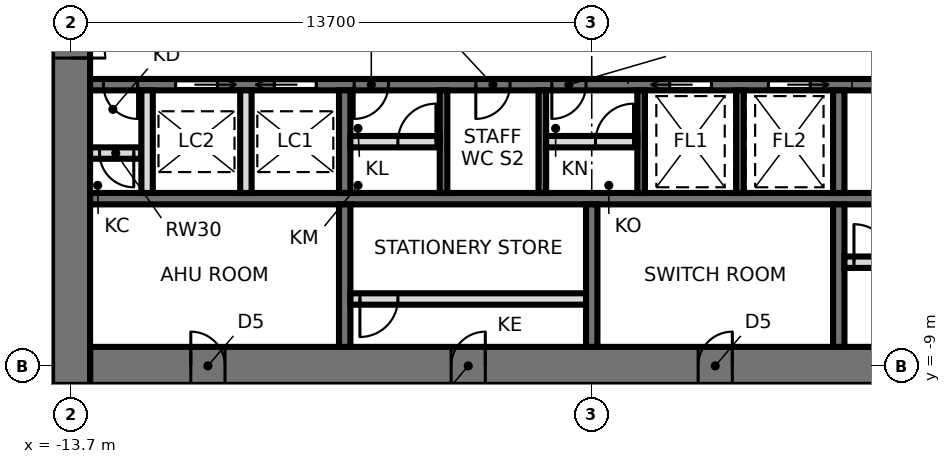
"""IFC4 building model, lengths in metres.
Left out: names, types, materials, properties, quantities, classifications, styles, units other than length and angle.
Written with IfcOpenShell. Run it as: python <this file> out.ifc"""

import sys

from ifc_helpers import new_model, si_unit, direction, frame, frame_2d, origin, place, context, subcontext, project, spatial, rectangle, extrude, element, fill, save


model = new_model("IFC4")
c1 = context("Model", 3, precision=1e-05, world=origin(), true_north=direction((0.0, 1.0)))
c2 = subcontext(c1, "Body", "Model", "MODEL_VIEW")
j1 = project(units=[si_unit("LENGTHUNIT", "METRE"), si_unit("PLANEANGLEUNIT", "RADIAN")], contexts=[c1])
p1 = place(None, origin())
s1 = spatial("IfcSite", under=j1, at=p1, CompositionType="ELEMENT")
p2 = place(p1, origin())
s2 = spatial("IfcBuilding", under=s1, at=p2, CompositionType="ELEMENT")
p3 = place(p2, frame((0.0, 0.0, 226.7)))
s3 = spatial("IfcBuildingStorey", under=s2, at=p3, CompositionType="ELEMENT", Elevation=226.7)
p4 = place(p3, frame((-13.2, -9.0, 0.0), z_axis=(0.0, 0.0, 1.0), x_axis=(1.0, 0.0, 0.0)))
e1 = element("IfcWall", 1, at=p4, inside=s3, PredefinedType="SHEAR", context=c2, shape_type="SweptSolid", body=[
    extrude(rectangle(XDim=26.4, YDim=1.0, at=frame_2d((13.2, 0.0))), origin(), (0.0, 0.0, 1.0), 3.9),
])
p5 = place(p4, frame((2.65, 0.0, 0.0)))
e2 = element("IfcOpeningElement", 2, at=p5, cuts=e1, PredefinedType="OPENING", context=c2, shape_type="SweptSolid", body=[
    extrude(rectangle(XDim=0.9, YDim=2.1, at=frame_2d((0.45, 1.05))), frame((0.0, 0.51, 0.0), z_axis=(0.0, -1.0, 0.0), x_axis=(1.0, 0.0, 0.0)), (0.0, 0.0, 1.0), 1.02),
])
p6 = place(p4, frame((9.5, 0.0, 0.0)))
e3 = element("IfcOpeningElement", 3, at=p6, cuts=e1, PredefinedType="OPENING", context=c2, shape_type="SweptSolid", body=[
    extrude(rectangle(XDim=0.9, YDim=2.1, at=frame_2d((0.45, 1.05))), frame((0.0, 0.51, 0.0), z_axis=(0.0, -1.0, 0.0), x_axis=(1.0, 0.0, 0.0)), (0.0, 0.0, 1.0), 1.02),
])
p7 = place(p4, frame((16.0, 0.0, 0.0)))
e4 = element("IfcOpeningElement", 4, at=p7, cuts=e1, PredefinedType="OPENING", context=c2, shape_type="SweptSolid", body=[
    extrude(rectangle(XDim=0.9, YDim=2.1, at=frame_2d((0.45, 1.05))), frame((0.0, 0.51, 0.0), z_axis=(0.0, -1.0, 0.0), x_axis=(1.0, 0.0, 0.0)), (0.0, 0.0, 1.0), 1.02),
])
p8 = place(p4, frame((22.85, 0.0, 0.0)))
e5 = element("IfcOpeningElement", 5, at=p8, cuts=e1, PredefinedType="OPENING", context=c2, shape_type="SweptSolid", body=[
    extrude(rectangle(XDim=0.9, YDim=2.1, at=frame_2d((0.45, 1.05))), frame((0.0, 0.51, 0.0), z_axis=(0.0, -1.0, 0.0), x_axis=(1.0, 0.0, 0.0)), (0.0, 0.0, 1.0), 1.02),
])
p9 = place(p3, frame((-13.7, 9.5, 0.0), z_axis=(0.0, 0.0, 1.0), x_axis=(0.0, -1.0, 0.0)))
e6 = element("IfcWall", 6, at=p9, inside=s3, PredefinedType="SHEAR", context=c2, shape_type="SweptSolid", body=[
    extrude(rectangle(XDim=19.0, YDim=1.0, at=frame_2d((9.5, 0.0))), origin(), (0.0, 0.0, 1.0), 3.9),
])
p10 = place(p9, frame((8.6, 0.0, 0.0)))
e7 = element("IfcOpeningElement", 7, at=p10, cuts=e6, PredefinedType="OPENING", context=c2, shape_type="SweptSolid", body=[
    extrude(rectangle(XDim=1.8, YDim=2.4, at=frame_2d((0.9, 1.2))), frame((0.0, 0.51, 0.0), z_axis=(0.0, -1.0, 0.0), x_axis=(1.0, 0.0, 0.0)), (0.0, 0.0, 1.0), 1.02),
])
p11 = place(p3, frame((-13.2, -1.6, 0.0), z_axis=(0.0, 0.0, 1.0), x_axis=(1.0, 0.0, 0.0)))
e8 = element("IfcWall", 8, at=p11, inside=s3, PredefinedType="SHEAR", context=c2, shape_type="SweptSolid", body=[
    extrude(rectangle(XDim=26.4, YDim=0.3, at=frame_2d((13.2, 0.0))), origin(), (0.0, 0.0, 1.0), 3.9),
])
p12 = place(p11, frame((25.15, 0.0, 0.0)))
e9 = element("IfcOpeningElement", 9, at=p12, cuts=e8, PredefinedType="OPENING", context=c2, shape_type="SweptSolid", body=[
    extrude(rectangle(XDim=1.0, YDim=2.1, at=frame_2d((0.5, 1.05))), frame((0.0, 0.16, 0.0), z_axis=(0.0, -1.0, 0.0), x_axis=(1.0, 0.0, 0.0)), (0.0, 0.0, 1.0), 0.32),
])
p13 = place(p11, frame((6.95, 0.0, 0.0)))
e10 = element("IfcOpeningElement", 10, at=p13, cuts=e8, PredefinedType="OPENING", context=c2, shape_type="SweptSolid", body=[
    extrude(rectangle(XDim=0.9, YDim=2.1, at=frame_2d((0.45, 1.05))), frame((0.0, 0.16, 0.0), z_axis=(0.0, -1.0, 0.0), x_axis=(1.0, 0.0, 0.0)), (0.0, 0.0, 1.0), 0.32),
])
p14 = place(p11, frame((10.15, 0.0, 0.0)))
e11 = element("IfcOpeningElement", 11, at=p14, cuts=e8, PredefinedType="OPENING", context=c2, shape_type="SweptSolid", body=[
    extrude(rectangle(XDim=0.9, YDim=2.1, at=frame_2d((0.45, 1.05))), frame((0.0, 0.16, 0.0), z_axis=(0.0, -1.0, 0.0), x_axis=(1.0, 0.0, 0.0)), (0.0, 0.0, 1.0), 0.32),
])
p15 = place(p11, frame((12.15, 0.0, 0.0)))
e12 = element("IfcOpeningElement", 12, at=p15, cuts=e8, PredefinedType="OPENING", context=c2, shape_type="SweptSolid", body=[
    extrude(rectangle(XDim=0.9, YDim=2.1, at=frame_2d((0.45, 1.05))), frame((0.0, 0.16, 0.0), z_axis=(0.0, -1.0, 0.0), x_axis=(1.0, 0.0, 0.0)), (0.0, 0.0, 1.0), 0.32),
])
p16 = place(p11, frame((15.25, 0.0, 0.0)))
e13 = element("IfcOpeningElement", 13, at=p16, cuts=e8, PredefinedType="OPENING", context=c2, shape_type="SweptSolid", body=[
    extrude(rectangle(XDim=1.1, YDim=2.3, at=frame_2d((0.55, 1.15))), frame((0.0, 0.16, 0.0), z_axis=(0.0, -1.0, 0.0), x_axis=(1.0, 0.0, 0.0)), (0.0, 0.0, 1.0), 0.32),
])
p17 = place(p11, frame((17.85, 0.0, 0.0)))
e14 = element("IfcOpeningElement", 14, at=p17, cuts=e8, PredefinedType="OPENING", context=c2, shape_type="SweptSolid", body=[
    extrude(rectangle(XDim=1.1, YDim=2.3, at=frame_2d((0.55, 1.15))), frame((0.0, 0.16, 0.0), z_axis=(0.0, -1.0, 0.0), x_axis=(1.0, 0.0, 0.0)), (0.0, 0.0, 1.0), 0.32),
])
p18 = place(p11, frame((4.85, 0.0, 0.0)))
e15 = element("IfcOpeningElement", 15, at=p18, cuts=e8, PredefinedType="OPENING", context=c2, shape_type="SweptSolid", body=[
    extrude(rectangle(XDim=1.1, YDim=2.3, at=frame_2d((0.55, 1.15))), frame((0.0, 0.16, 0.0), z_axis=(0.0, -1.0, 0.0), x_axis=(1.0, 0.0, 0.0)), (0.0, 0.0, 1.0), 0.32),
])
p19 = place(p11, frame((2.25, 0.0, 0.0)))
e16 = element("IfcOpeningElement", 16, at=p19, cuts=e8, PredefinedType="OPENING", context=c2, shape_type="SweptSolid", body=[
    extrude(rectangle(XDim=1.1, YDim=2.3, at=frame_2d((0.55, 1.15))), frame((0.0, 0.16, 0.0), z_axis=(0.0, -1.0, 0.0), x_axis=(1.0, 0.0, 0.0)), (0.0, 0.0, 1.0), 0.32),
])
p20 = place(p11, frame((0.35, 0.0, 0.0)))
e17 = element("IfcOpeningElement", 17, at=p20, cuts=e8, PredefinedType="OPENING", context=c2, shape_type="SweptSolid", body=[
    extrude(rectangle(XDim=0.9, YDim=2.1, at=frame_2d((0.45, 1.05))), frame((0.0, 0.16, 0.0), z_axis=(0.0, -1.0, 0.0), x_axis=(1.0, 0.0, 0.0)), (0.0, 0.0, 1.0), 0.32),
])
p21 = place(p3, frame((-13.2, -4.6, 0.0), z_axis=(0.0, 0.0, 1.0), x_axis=(1.0, 0.0, 0.0)))
e18 = element("IfcWall", 18, at=p21, inside=s3, PredefinedType="SHEAR", context=c2, shape_type="SweptSolid", body=[
    extrude(rectangle(XDim=26.4, YDim=0.3, at=frame_2d((13.2, 0.0))), origin(), (0.0, 0.0, 1.0), 3.9),
])
p22 = place(p3, frame((-6.5, -1.75, 0.0), z_axis=(0.0, 0.0, 1.0), x_axis=(0.0, -1.0, 0.0)))
e19 = element("IfcWall", 19, at=p22, inside=s3, PredefinedType="SHEAR", context=c2, shape_type="SweptSolid", body=[
    extrude(rectangle(XDim=2.7, YDim=0.3, at=frame_2d((1.35, 0.0))), origin(), (0.0, 0.0, 1.0), 3.9),
])
p23 = place(p3, frame((-6.5, -4.75, 0.0), z_axis=(0.0, 0.0, 1.0), x_axis=(0.0, -1.0, 0.0)))
e20 = element("IfcWall", 20, at=p23, inside=s3, PredefinedType="SHEAR", context=c2, shape_type="SweptSolid", body=[
    extrude(rectangle(XDim=3.75, YDim=0.3, at=frame_2d((1.875, 0.0))), origin(), (0.0, 0.0, 1.0), 3.9),
])
p24 = place(p3, frame((6.5, -1.75, 0.0), z_axis=(0.0, 0.0, 1.0), x_axis=(0.0, -1.0, 0.0)))
e21 = element("IfcWall", 21, at=p24, inside=s3, PredefinedType="SHEAR", context=c2, shape_type="SweptSolid", body=[
    extrude(rectangle(XDim=2.7, YDim=0.3, at=frame_2d((1.35, 0.0))), origin(), (0.0, 0.0, 1.0), 3.9),
])
p25 = place(p3, frame((6.5, -4.75, 0.0), z_axis=(0.0, 0.0, 1.0), x_axis=(0.0, -1.0, 0.0)))
e22 = element("IfcWall", 22, at=p25, inside=s3, PredefinedType="SHEAR", context=c2, shape_type="SweptSolid", body=[
    extrude(rectangle(XDim=3.75, YDim=0.3, at=frame_2d((1.875, 0.0))), origin(), (0.0, 0.0, 1.0), 3.9),
])
for number, where, z_axis, x_axis in (
    (23, (-3.9, -1.75, 0.0), (0.0, 0.0, 1.0), (0.0, -1.0, 0.0)),
    (24, (-1.3, -1.75, 0.0), (0.0, 0.0, 1.0), (0.0, -1.0, 0.0)),
    (25, (1.3, -1.75, 0.0), (0.0, 0.0, 1.0), (0.0, -1.0, 0.0)),
    (26, (3.9, -1.75, 0.0), (0.0, 0.0, 1.0), (0.0, -1.0, 0.0)),
):
    element("IfcWall", number, at=place(p3, frame(where, z_axis=z_axis, x_axis=x_axis)), inside=s3, PredefinedType="SHEAR", context=c2, shape_type="SweptSolid", body=[
        extrude(rectangle(XDim=2.7, YDim=0.2, at=frame_2d((1.35, 0.0))), origin(), (0.0, 0.0, 1.0), 3.9),
    ])
p26 = place(p3, frame((0.0, -4.75, 0.0), z_axis=(0.0, 0.0, 1.0), x_axis=(0.0, -1.0, 0.0)))
e27 = element("IfcWall", 27, at=p26, inside=s3, PredefinedType="SHEAR", context=c2, shape_type="SweptSolid", body=[
    extrude(rectangle(XDim=3.75, YDim=0.3, at=frame_2d((1.875, 0.0))), origin(), (0.0, 0.0, 1.0), 3.9),
])
p27 = place(p3, frame((-6.35, -3.1, 0.0), z_axis=(0.0, 0.0, 1.0), x_axis=(1.0, 0.0, 0.0)))
e28 = element("IfcWall", 28, at=p27, inside=s3, PredefinedType="PARTITIONING", context=c2, shape_type="SweptSolid", body=[
    extrude(rectangle(XDim=2.35, YDim=0.3, at=frame_2d((1.175, 0.0))), origin(), (0.0, 0.0, 1.0), 3.74),
])
p28 = place(p27, frame((1.25, 0.0, 0.0)))
e29 = element("IfcOpeningElement", 29, at=p28, cuts=e28, PredefinedType="OPENING", context=c2, shape_type="SweptSolid", body=[
    extrude(rectangle(XDim=1.0, YDim=2.4, at=frame_2d((0.5, 1.2))), frame((0.0, 0.16, 0.0), z_axis=(0.0, -1.0, 0.0), x_axis=(1.0, 0.0, 0.0)), (0.0, 0.0, 1.0), 0.32),
])
p29 = place(p3, frame((-1.2, -3.1, 0.0), z_axis=(0.0, 0.0, 1.0), x_axis=(1.0, 0.0, 0.0)))
e30 = element("IfcWall", 30, at=p29, inside=s3, PredefinedType="PARTITIONING", context=c2, shape_type="SweptSolid", body=[
    extrude(rectangle(XDim=2.4, YDim=0.3, at=frame_2d((1.2, 0.0))), origin(), (0.0, 0.0, 1.0), 3.74),
])
p30 = place(p29, frame((1.3, 0.0, 0.0)))
e31 = element("IfcOpeningElement", 31, at=p30, cuts=e30, PredefinedType="OPENING", context=c2, shape_type="SweptSolid", body=[
    extrude(rectangle(XDim=1.0, YDim=2.4, at=frame_2d((0.5, 1.2))), frame((0.0, 0.16, 0.0), z_axis=(0.0, -1.0, 0.0), x_axis=(1.0, 0.0, 0.0)), (0.0, 0.0, 1.0), 0.32),
])
p31 = place(p3, frame((-6.35, -7.24, 0.0), z_axis=(0.0, 0.0, 1.0), x_axis=(1.0, 0.0, 0.0)))
e32 = element("IfcWall", 32, at=p31, inside=s3, PredefinedType="PARTITIONING", context=c2, shape_type="SweptSolid", body=[
    extrude(rectangle(XDim=6.2, YDim=0.3, at=frame_2d((3.1, 0.0))), origin(), (0.0, 0.0, 1.0), 3.74),
])
p32 = place(p31, frame((0.25, 0.0, 0.0)))
e33 = element("IfcOpeningElement", 33, at=p32, cuts=e32, PredefinedType="OPENING", context=c2, shape_type="SweptSolid", body=[
    extrude(rectangle(XDim=1.0, YDim=2.4, at=frame_2d((0.5, 1.2))), frame((0.0, 0.16, 0.0), z_axis=(0.0, -1.0, 0.0), x_axis=(1.0, 0.0, 0.0)), (0.0, 0.0, 1.0), 0.32),
])
p33 = place(p3, frame((6.65, -6.272, 0.0), z_axis=(0.0, 0.0, 1.0), x_axis=(1.0, 0.0, 0.0)))
e34 = element("IfcWall", 34, at=p33, inside=s3, PredefinedType="PARTITIONING", context=c2, shape_type="SweptSolid", body=[
    extrude(rectangle(XDim=6.55, YDim=0.3, at=frame_2d((3.275, 0.0))), origin(), (0.0, 0.0, 1.0), 3.74),
])
p34 = place(p33, frame((0.25, 0.0, 0.0)))
e35 = element("IfcOpeningElement", 35, at=p34, cuts=e34, PredefinedType="OPENING", context=c2, shape_type="SweptSolid", body=[
    extrude(rectangle(XDim=1.0, YDim=2.4, at=frame_2d((0.5, 1.2))), frame((0.0, 0.16, 0.0), z_axis=(0.0, -1.0, 0.0), x_axis=(1.0, 0.0, 0.0)), (0.0, 0.0, 1.0), 0.32),
])
p35 = place(p3, frame((-13.2, -3.4, 0.0), z_axis=(0.0, 0.0, 1.0), x_axis=(1.0, 0.0, 0.0)))
e36 = element("IfcWall", 36, at=p35, inside=s3, PredefinedType="SOLIDWALL", context=c2, shape_type="SweptSolid", body=[
    extrude(rectangle(XDim=1.35, YDim=0.3, at=frame_2d((0.675, 0.0))), origin(), (0.0, 0.0, 1.0), 3.74),
])
p36 = place(p35, frame((0.25, 0.0, 0.0)))
e37 = element("IfcOpeningElement", 37, at=p36, cuts=e36, PredefinedType="OPENING", context=c2, shape_type="SweptSolid", body=[
    extrude(rectangle(XDim=0.9, YDim=2.1, at=frame_2d((0.45, 1.05))), frame((0.0, 0.16, 0.0), z_axis=(0.0, -1.0, 0.0), x_axis=(1.0, 0.0, 0.0)), (0.0, 0.0, 1.0), 0.32),
])
for number, where, z_axis, x_axis in (
    (38, (-9.1, -1.75, 0.0), (0.0, 0.0, 1.0), (0.0, -1.0, 0.0)),
    (39, (-11.7, -1.75, 0.0), (0.0, 0.0, 1.0), (0.0, -1.0, 0.0)),
):
    element("IfcWall", number, at=place(p3, frame(where, z_axis=z_axis, x_axis=x_axis)), inside=s3, PredefinedType="SOLIDWALL", context=c2, shape_type="SweptSolid", body=[
        extrude(rectangle(XDim=2.7, YDim=0.3, at=frame_2d((1.35, 0.0))), origin(), (0.0, 0.0, 1.0), 3.74),
    ])
p37 = place(p10, origin())
e40 = element("IfcDoor", 40, at=p37, inside=s3, OperationType="DOUBLE_DOOR_SINGLE_SWING", PredefinedType="DOOR", context=c2, shape_type="SweptSolid", body=[
    extrude(rectangle(XDim=1.72, YDim=2.36, at=frame_2d((0.9, 1.18))), frame((0.0, 0.025, 0.0), z_axis=(0.0, -1.0, 0.0), x_axis=(1.0, 0.0, 0.0)), (0.0, 0.0, 1.0), 0.05),
    extrude(rectangle(XDim=0.04, YDim=2.4, at=frame_2d((0.02, 1.2))), frame((0.0, 0.25, 0.0), z_axis=(0.0, -1.0, 0.0), x_axis=(1.0, 0.0, 0.0)), (0.0, 0.0, 1.0), 0.5),
    extrude(rectangle(XDim=0.04, YDim=2.4, at=frame_2d((1.78, 1.2))), frame((0.0, 0.25, 0.0), z_axis=(0.0, -1.0, 0.0), x_axis=(1.0, 0.0, 0.0)), (0.0, 0.0, 1.0), 0.5),
    extrude(rectangle(XDim=1.72, YDim=0.04, at=frame_2d((0.9, 2.38))), frame((0.0, 0.25, 0.0), z_axis=(0.0, -1.0, 0.0), x_axis=(1.0, 0.0, 0.0)), (0.0, 0.0, 1.0), 0.5),
])
fill(e7, e40)
p38 = place(p28, origin())
e41 = element("IfcDoor", 41, at=p38, inside=s3, OperationType="SINGLE_SWING_RIGHT", PredefinedType="DOOR", context=c2, shape_type="SweptSolid", body=[
    extrude(rectangle(XDim=1.0, YDim=2.4, at=frame_2d((0.5, 1.2))), frame((0.0, 0.025, 0.0), z_axis=(0.0, -1.0, 0.0), x_axis=(1.0, 0.0, 0.0)), (0.0, 0.0, 1.0), 0.05),
])
fill(e29, e41)
p39 = place(p13, frame((0.9, 0.0, 0.0), z_axis=(0.0, 0.0, 1.0), x_axis=(-1.0, 0.0, 0.0)))
e42 = element("IfcDoor", 42, at=p39, inside=s3, OperationType="SINGLE_SWING_RIGHT", PredefinedType="DOOR", context=c2, shape_type="SweptSolid", body=[
    extrude(rectangle(XDim=0.9, YDim=2.1, at=frame_2d((0.45, 1.05))), frame((0.0, 0.025, 0.0), z_axis=(0.0, -1.0, 0.0), x_axis=(1.0, 0.0, 0.0)), (0.0, 0.0, 1.0), 0.05),
])
fill(e10, e42)
p40 = place(p14, frame((0.9, 0.0, 0.0), z_axis=(0.0, 0.0, 1.0), x_axis=(-1.0, 0.0, 0.0)))
e43 = element("IfcDoor", 43, at=p40, inside=s3, OperationType="SINGLE_SWING_RIGHT", PredefinedType="DOOR", context=c2, shape_type="SweptSolid", body=[
    extrude(rectangle(XDim=0.9, YDim=2.1, at=frame_2d((0.45, 1.05))), frame((0.0, 0.025, 0.0), z_axis=(0.0, -1.0, 0.0), x_axis=(1.0, 0.0, 0.0)), (0.0, 0.0, 1.0), 0.05),
])
fill(e11, e43)
p41 = place(p30, origin())
e44 = element("IfcDoor", 44, at=p41, inside=s3, OperationType="SINGLE_SWING_RIGHT", PredefinedType="DOOR", context=c2, shape_type="SweptSolid", body=[
    extrude(rectangle(XDim=1.0, YDim=2.4, at=frame_2d((0.5, 1.2))), frame((0.0, 0.025, 0.0), z_axis=(0.0, -1.0, 0.0), x_axis=(1.0, 0.0, 0.0)), (0.0, 0.0, 1.0), 0.05),
])
fill(e31, e44)
p42 = place(p15, frame((0.9, 0.0, 0.0), z_axis=(0.0, 0.0, 1.0), x_axis=(-1.0, 0.0, 0.0)))
e45 = element("IfcDoor", 45, at=p42, inside=s3, OperationType="SINGLE_SWING_RIGHT", PredefinedType="DOOR", context=c2, shape_type="SweptSolid", body=[
    extrude(rectangle(XDim=0.9, YDim=2.1, at=frame_2d((0.45, 1.05))), frame((0.0, 0.025, 0.0), z_axis=(0.0, -1.0, 0.0), x_axis=(1.0, 0.0, 0.0)), (0.0, 0.0, 1.0), 0.05),
])
fill(e12, e45)
p43 = place(p16, frame((1.1, 0.0, 0.0), z_axis=(0.0, 0.0, 1.0), x_axis=(-1.0, 0.0, 0.0)))
e46 = element("IfcDoor", 46, at=p43, inside=s3, OperationType="SLIDING_TO_RIGHT", PredefinedType="DOOR", context=c2, shape_type="SweptSolid", body=[
    extrude(rectangle(XDim=1.1, YDim=2.3, at=frame_2d((0.55, 1.15))), frame((0.0, 0.025, 0.0), z_axis=(0.0, -1.0, 0.0), x_axis=(1.0, 0.0, 0.0)), (0.0, 0.0, 1.0), 0.05),
])
fill(e13, e46)
p44 = place(p17, frame((1.1, 0.0, 0.0), z_axis=(0.0, 0.0, 1.0), x_axis=(-1.0, 0.0, 0.0)))
e47 = element("IfcDoor", 47, at=p44, inside=s3, OperationType="SLIDING_TO_LEFT", PredefinedType="DOOR", context=c2, shape_type="SweptSolid", body=[
    extrude(rectangle(XDim=1.1, YDim=2.3, at=frame_2d((0.55, 1.15))), frame((0.0, 0.025, 0.0), z_axis=(0.0, -1.0, 0.0), x_axis=(1.0, 0.0, 0.0)), (0.0, 0.0, 1.0), 0.05),
])
fill(e14, e47)
p45 = place(p18, frame((1.1, 0.0, 0.0), z_axis=(0.0, 0.0, 1.0), x_axis=(-1.0, 0.0, 0.0)))
e48 = element("IfcDoor", 48, at=p45, inside=s3, OperationType="SLIDING_TO_RIGHT", PredefinedType="DOOR", context=c2, shape_type="SweptSolid", body=[
    extrude(rectangle(XDim=1.1, YDim=2.3, at=frame_2d((0.55, 1.15))), frame((0.0, 0.025, 0.0), z_axis=(0.0, -1.0, 0.0), x_axis=(1.0, 0.0, 0.0)), (0.0, 0.0, 1.0), 0.05),
])
fill(e15, e48)
p46 = place(p19, frame((1.1, 0.0, 0.0), z_axis=(0.0, 0.0, 1.0), x_axis=(-1.0, 0.0, 0.0)))
e49 = element("IfcDoor", 49, at=p46, inside=s3, OperationType="SLIDING_TO_LEFT", PredefinedType="DOOR", context=c2, shape_type="SweptSolid", body=[
    extrude(rectangle(XDim=1.1, YDim=2.3, at=frame_2d((0.55, 1.15))), frame((0.0, 0.025, 0.0), z_axis=(0.0, -1.0, 0.0), x_axis=(1.0, 0.0, 0.0)), (0.0, 0.0, 1.0), 0.05),
])
fill(e16, e49)
p47 = place(p20, frame((0.9, 0.0, 0.0), z_axis=(0.0, 0.0, 1.0), x_axis=(-1.0, 0.0, 0.0)))
e50 = element("IfcDoor", 50, at=p47, inside=s3, OperationType="SINGLE_SWING_LEFT", PredefinedType="DOOR", context=c2, shape_type="SweptSolid", body=[
    extrude(rectangle(XDim=0.9, YDim=2.1, at=frame_2d((0.45, 1.05))), frame((0.0, 0.025, 0.0), z_axis=(0.0, -1.0, 0.0), x_axis=(1.0, 0.0, 0.0)), (0.0, 0.0, 1.0), 0.05),
])
fill(e17, e50)
p48 = place(p5, origin())
e51 = element("IfcDoor", 51, at=p48, inside=s3, OperationType="SINGLE_SWING_LEFT", PredefinedType="DOOR", context=c2, shape_type="SweptSolid", body=[
    extrude(rectangle(XDim=0.82, YDim=2.06, at=frame_2d((0.45, 1.03))), frame((0.0, 0.025, 0.0), z_axis=(0.0, -1.0, 0.0), x_axis=(1.0, 0.0, 0.0)), (0.0, 0.0, 1.0), 0.05),
    extrude(rectangle(XDim=0.04, YDim=2.1, at=frame_2d((0.02, 1.05))), frame((0.0, 0.25, 0.0), z_axis=(0.0, -1.0, 0.0), x_axis=(1.0, 0.0, 0.0)), (0.0, 0.0, 1.0), 0.5),
    extrude(rectangle(XDim=0.04, YDim=2.1, at=frame_2d((0.88, 1.05))), frame((0.0, 0.25, 0.0), z_axis=(0.0, -1.0, 0.0), x_axis=(1.0, 0.0, 0.0)), (0.0, 0.0, 1.0), 0.5),
    extrude(rectangle(XDim=0.82, YDim=0.04, at=frame_2d((0.45, 2.08))), frame((0.0, 0.25, 0.0), z_axis=(0.0, -1.0, 0.0), x_axis=(1.0, 0.0, 0.0)), (0.0, 0.0, 1.0), 0.5),
])
fill(e2, e51)
p49 = place(p6, origin())
e52 = element("IfcDoor", 52, at=p49, inside=s3, OperationType="SINGLE_SWING_RIGHT", PredefinedType="DOOR", context=c2, shape_type="SweptSolid", body=[
    extrude(rectangle(XDim=0.82, YDim=2.06, at=frame_2d((0.45, 1.03))), frame((0.0, 0.025, 0.0), z_axis=(0.0, -1.0, 0.0), x_axis=(1.0, 0.0, 0.0)), (0.0, 0.0, 1.0), 0.05),
    extrude(rectangle(XDim=0.04, YDim=2.1, at=frame_2d((0.02, 1.05))), frame((0.0, 0.25, 0.0), z_axis=(0.0, -1.0, 0.0), x_axis=(1.0, 0.0, 0.0)), (0.0, 0.0, 1.0), 0.5),
    extrude(rectangle(XDim=0.04, YDim=2.1, at=frame_2d((0.88, 1.05))), frame((0.0, 0.25, 0.0), z_axis=(0.0, -1.0, 0.0), x_axis=(1.0, 0.0, 0.0)), (0.0, 0.0, 1.0), 0.5),
    extrude(rectangle(XDim=0.82, YDim=0.04, at=frame_2d((0.45, 2.08))), frame((0.0, 0.25, 0.0), z_axis=(0.0, -1.0, 0.0), x_axis=(1.0, 0.0, 0.0)), (0.0, 0.0, 1.0), 0.5),
])
fill(e3, e52)
p50 = place(p7, origin())
e53 = element("IfcDoor", 53, at=p50, inside=s3, OperationType="SINGLE_SWING_RIGHT", PredefinedType="DOOR", context=c2, shape_type="SweptSolid", body=[
    extrude(rectangle(XDim=0.82, YDim=2.06, at=frame_2d((0.45, 1.03))), frame((0.0, 0.025, 0.0), z_axis=(0.0, -1.0, 0.0), x_axis=(1.0, 0.0, 0.0)), (0.0, 0.0, 1.0), 0.05),
    extrude(rectangle(XDim=0.04, YDim=2.1, at=frame_2d((0.02, 1.05))), frame((0.0, 0.25, 0.0), z_axis=(0.0, -1.0, 0.0), x_axis=(1.0, 0.0, 0.0)), (0.0, 0.0, 1.0), 0.5),
    extrude(rectangle(XDim=0.04, YDim=2.1, at=frame_2d((0.88, 1.05))), frame((0.0, 0.25, 0.0), z_axis=(0.0, -1.0, 0.0), x_axis=(1.0, 0.0, 0.0)), (0.0, 0.0, 1.0), 0.5),
    extrude(rectangle(XDim=0.82, YDim=0.04, at=frame_2d((0.45, 2.08))), frame((0.0, 0.25, 0.0), z_axis=(0.0, -1.0, 0.0), x_axis=(1.0, 0.0, 0.0)), (0.0, 0.0, 1.0), 0.5),
])
fill(e4, e53)
p51 = place(p32, frame((1.0, 0.0, 0.0), z_axis=(0.0, 0.0, 1.0), x_axis=(-1.0, 0.0, 0.0)))
e54 = element("IfcDoor", 54, at=p51, inside=s3, OperationType="SINGLE_SWING_RIGHT", PredefinedType="DOOR", context=c2, shape_type="SweptSolid", body=[
    extrude(rectangle(XDim=1.0, YDim=2.4, at=frame_2d((0.5, 1.2))), frame((0.0, 0.025, 0.0), z_axis=(0.0, -1.0, 0.0), x_axis=(1.0, 0.0, 0.0)), (0.0, 0.0, 1.0), 0.05),
])
fill(e33, e54)
p52 = place(p34, origin())
e55 = element("IfcDoor", 55, at=p52, inside=s3, OperationType="SINGLE_SWING_LEFT", PredefinedType="DOOR", context=c2, shape_type="SweptSolid", body=[
    extrude(rectangle(XDim=1.0, YDim=2.4, at=frame_2d((0.5, 1.2))), frame((0.0, 0.025, 0.0), z_axis=(0.0, -1.0, 0.0), x_axis=(1.0, 0.0, 0.0)), (0.0, 0.0, 1.0), 0.05),
])
fill(e35, e55)
p53 = place(p36, frame((0.9, 0.0, 0.0), z_axis=(0.0, 0.0, 1.0), x_axis=(-1.0, 0.0, 0.0)))
e56 = element("IfcDoor", 56, at=p53, inside=s3, OperationType="SINGLE_SWING_LEFT", PredefinedType="DOOR", context=c2, shape_type="SweptSolid", body=[
    extrude(rectangle(XDim=0.9, YDim=2.1, at=frame_2d((0.45, 1.05))), frame((0.0, 0.025, 0.0), z_axis=(0.0, -1.0, 0.0), x_axis=(1.0, 0.0, 0.0)), (0.0, 0.0, 1.0), 0.05),
])
fill(e37, e56)
save(model, sys.argv[1])
